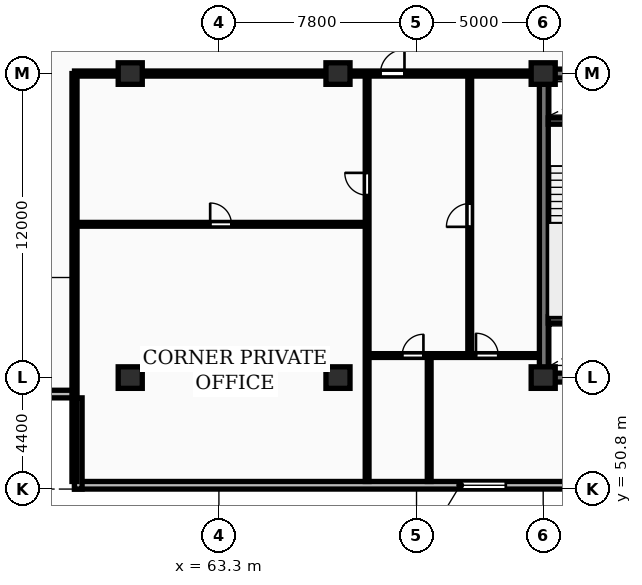
"""IFC4 building model, lengths in metres.
Left out: names, types, materials, properties, quantities, classifications, styles, units other than length and angle.
Written with IfcOpenShell. Run it as: python <this file> out.ifc"""

import sys

from ifc_helpers import new_model, si_unit, direction, frame, frame_2d, origin, origin_2d, place, context, subcontext, project, spatial, rectangle, extrude, element, fill, save


model = new_model("IFC4")
c1 = context("Model", 3, precision=1e-05, world=origin(), true_north=direction((0.0, 1.0)))
c2 = subcontext(c1, "Body", "Model", "MODEL_VIEW")
j1 = project(units=[si_unit("LENGTHUNIT", "METRE"), si_unit("PLANEANGLEUNIT", "RADIAN")], contexts=[c1])
p1 = place(None, origin())
s1 = spatial("IfcSite", under=j1, at=p1, CompositionType="ELEMENT")
p2 = place(p1, origin())
s2 = spatial("IfcBuilding", under=s1, at=p2, CompositionType="ELEMENT")
p3 = place(p2, frame((0.0, 0.0, 126.3)))
s3 = spatial("IfcBuildingStorey", under=s2, at=p3, CompositionType="ELEMENT", Elevation=126.3)
for number, where, z_axis, x_axis in (
    (1, (59.8, 55.2, 0.0), (0.0, 0.0, 1.0), (1.0, 0.0, 0.0)),
    (2, (59.8, 67.2, 0.0), (0.0, 0.0, 1.0), (1.0, 0.0, 0.0)),
    (3, (68.0, 55.2, 0.0), (0.0, 0.0, 1.0), (1.0, 0.0, 0.0)),
    (4, (68.0, 67.2, 0.0), (0.0, 0.0, 1.0), (1.0, 0.0, 0.0)),
    (5, (76.1, 55.2, 0.0), (0.0, 0.0, 1.0), (1.0, 0.0, 0.0)),
    (6, (76.1, 67.2, 0.0), (0.0, 0.0, 1.0), (1.0, 0.0, 0.0)),
):
    element("IfcColumn", number, at=place(p3, frame(where, z_axis=z_axis, x_axis=x_axis)), inside=s3, PredefinedType="COLUMN", context=c2, shape_type="SweptSolid", body=[
        extrude(rectangle(XDim=0.95, YDim=0.85, at=origin_2d()), origin(), (0.0, 0.0, 1.0), 3.25),
    ])
p4 = place(p3, frame((57.6, 50.95, 0.0), z_axis=(0.0, 0.0, 1.0), x_axis=(1.0, 0.0, 0.0)))
e7 = element("IfcWall", 7, at=p4, inside=s3, PredefinedType="STANDARD", context=c2, shape_type="SweptSolid", body=[
    extrude(rectangle(XDim=73.0, YDim=0.3, at=frame_2d((36.5, 0.0))), origin(), (0.0, 0.0, 1.0), 2.97),
])
p5 = place(p4, frame((15.225, 0.0, 0.85)))
e8 = element("IfcOpeningElement", 8, at=p5, cuts=e7, PredefinedType="OPENING", context=c2, shape_type="SweptSolid", body=[
    extrude(rectangle(XDim=1.8, YDim=1.8, at=frame_2d((0.9, 0.9))), frame((0.0, 0.16, 0.0), z_axis=(0.0, -1.0, 0.0), x_axis=(1.0, 0.0, 0.0)), (0.0, 0.0, 1.0), 0.32),
])
p6 = place(p4, frame((58.575, 0.0, 0.85)))
e9 = element("IfcOpeningElement", 9, at=p6, cuts=e7, PredefinedType="OPENING", context=c2, shape_type="SweptSolid", body=[
    extrude(rectangle(XDim=1.8, YDim=1.8, at=frame_2d((0.9, 0.9))), frame((0.0, 0.16, 0.0), z_axis=(0.0, -1.0, 0.0), x_axis=(1.0, 0.0, 0.0)), (0.0, 0.0, 1.0), 0.32),
])
p7 = place(p3, frame((54.0, 54.55, 0.0), z_axis=(0.0, 0.0, 1.0), x_axis=(1.0, 0.0, 0.0)))
e10 = element("IfcWall", 10, at=p7, inside=s3, PredefinedType="STANDARD", context=c2, shape_type="SweptSolid", body=[
    extrude(rectangle(XDim=3.6, YDim=0.3, at=frame_2d((1.8, 0.0))), origin(), (0.0, 0.0, 1.0), 2.97),
])
p8 = place(p3, frame((57.75, 54.4, 0.0), z_axis=(0.0, 0.0, 1.0), x_axis=(0.0, -1.0, 0.0)))
e11 = element("IfcWall", 11, at=p8, inside=s3, PredefinedType="STANDARD", context=c2, shape_type="SweptSolid", body=[
    extrude(rectangle(XDim=3.6, YDim=0.3, at=frame_2d((1.8, 0.0))), origin(), (0.0, 0.0, 1.0), 2.97),
])
p9 = place(p3, frame((75.95, 55.2, 0.0), z_axis=(0.0, 0.0, 1.0), x_axis=(1.0, 0.0, 0.0)))
e12 = element("IfcWall", 12, at=p9, inside=s3, PredefinedType="SHEAR", context=c2, shape_type="SweptSolid", body=[
    extrude(rectangle(XDim=36.3, YDim=0.35, at=frame_2d((18.15, 0.0))), origin(), (0.0, 0.0, 1.0), 3.25),
])
p10 = place(p3, frame((76.125, 55.375, 0.0), z_axis=(0.0, 0.0, 1.0), x_axis=(0.0, 1.0, 0.0)))
e13 = element("IfcWall", 13, at=p10, inside=s3, PredefinedType="SHEAR", context=c2, shape_type="SweptSolid", body=[
    extrude(rectangle(XDim=11.65, YDim=0.35, at=frame_2d((5.825, 0.0))), origin(), (0.0, 0.0, 1.0), 3.25),
])
p11 = place(p3, frame((75.95, 67.2, 0.0), z_axis=(0.0, 0.0, 1.0), x_axis=(1.0, 0.0, 0.0)))
e14 = element("IfcWall", 14, at=p11, inside=s3, PredefinedType="SHEAR", context=c2, shape_type="SweptSolid", body=[
    extrude(rectangle(XDim=36.3, YDim=0.35, at=frame_2d((18.15, 0.0))), origin(), (0.0, 0.0, 1.0), 3.25),
])
p12 = place(p11, frame((5.25, 0.0, 0.0)))
e15 = element("IfcOpeningElement", 15, at=p12, cuts=e14, PredefinedType="OPENING", context=c2, shape_type="SweptSolid", body=[
    extrude(rectangle(XDim=1.0, YDim=2.15, at=frame_2d((0.5, 1.075))), frame((0.0, 0.185, 0.0), z_axis=(0.0, -1.0, 0.0), x_axis=(1.0, 0.0, 0.0)), (0.0, 0.0, 1.0), 0.37),
])
p13 = place(p11, frame((21.6, 0.0, 0.0)))
e16 = element("IfcOpeningElement", 16, at=p13, cuts=e14, PredefinedType="OPENING", context=c2, shape_type="SweptSolid", body=[
    extrude(rectangle(XDim=1.5, YDim=2.2, at=frame_2d((0.75, 1.1))), frame((0.0, 0.185, 0.0), z_axis=(0.0, -1.0, 0.0), x_axis=(1.0, 0.0, 0.0)), (0.0, 0.0, 1.0), 0.37),
])
p14 = place(p11, frame((30.45, 0.0, 0.0)))
e17 = element("IfcOpeningElement", 17, at=p14, cuts=e14, PredefinedType="OPENING", context=c2, shape_type="SweptSolid", body=[
    extrude(rectangle(XDim=1.0, YDim=2.15, at=frame_2d((0.5, 1.075))), frame((0.0, 0.185, 0.0), z_axis=(0.0, -1.0, 0.0), x_axis=(1.0, 0.0, 0.0)), (0.0, 0.0, 1.0), 0.37),
])
for number, where, z_axis, x_axis in (
    (18, (76.3, 57.475, 0.0), (0.0, 0.0, 1.0), (1.0, 0.0, 0.0)),
    (19, (76.3, 65.325, 0.0), (0.0, 0.0, 1.0), (1.0, 0.0, 0.0)),
):
    element("IfcWall", number, at=place(p3, frame(where, z_axis=z_axis, x_axis=x_axis)), inside=s3, PredefinedType="SHEAR", context=c2, shape_type="SweptSolid", body=[
        extrude(rectangle(XDim=3.24, YDim=0.25, at=frame_2d((1.62, 0.0))), origin(), (0.0, 0.0, 1.0), 3.25),
    ])
p15 = place(p3, frame((57.6, 51.1, 0.0), z_axis=(0.0, 0.0, 1.0), x_axis=(0.0, 1.0, 0.0)))
e20 = element("IfcWall", 20, at=p15, inside=s3, PredefinedType="PARTITIONING", context=c2, shape_type="SweptSolid", body=[
    extrude(rectangle(XDim=16.1, YDim=0.2, at=frame_2d((8.05, 0.0))), origin(), (0.0, 0.0, 1.0), 2.97),
])
p16 = place(p3, frame((57.6, 61.25, 0.0), z_axis=(0.0, 0.0, 1.0), x_axis=(1.0, 0.0, 0.0)))
e21 = element("IfcWall", 21, at=p16, inside=s3, PredefinedType="PARTITIONING", context=c2, shape_type="SweptSolid", body=[
    extrude(rectangle(XDim=11.55, YDim=0.15, at=frame_2d((5.775, 0.0))), origin(), (0.0, 0.0, 1.0), 2.97),
])
p17 = place(p16, frame((5.355, 0.0, 0.0)))
e22 = element("IfcOpeningElement", 22, at=p17, cuts=e21, PredefinedType="OPENING", context=c2, shape_type="SweptSolid", body=[
    extrude(rectangle(XDim=0.84, YDim=2.04, at=frame_2d((0.42, 1.02))), frame((0.0, 0.085, 0.0), z_axis=(0.0, -1.0, 0.0), x_axis=(1.0, 0.0, 0.0)), (0.0, 0.0, 1.0), 0.17),
])
p18 = place(p3, frame((69.15, 51.1, 0.0), z_axis=(0.0, 0.0, 1.0), x_axis=(0.0, 1.0, 0.0)))
e23 = element("IfcWall", 23, at=p18, inside=s3, PredefinedType="PARTITIONING", context=c2, shape_type="SweptSolid", body=[
    extrude(rectangle(XDim=16.05, YDim=0.15, at=frame_2d((8.025, 0.0))), origin(), (0.0, 0.0, 1.0), 2.97),
])
p19 = place(p18, frame((11.3, 0.0, 0.0)))
e24 = element("IfcOpeningElement", 24, at=p19, cuts=e23, PredefinedType="OPENING", context=c2, shape_type="SweptSolid", body=[
    extrude(rectangle(XDim=0.88, YDim=2.06, at=frame_2d((0.44, 1.03))), frame((0.0, 0.085, 0.0), z_axis=(0.0, -1.0, 0.0), x_axis=(1.0, 0.0, 0.0)), (0.0, 0.0, 1.0), 0.17),
])
p20 = place(p3, frame((73.2, 56.07, 0.0), z_axis=(0.0, 0.0, 1.0), x_axis=(0.0, 1.0, 0.0)))
e25 = element("IfcWall", 25, at=p20, inside=s3, PredefinedType="PARTITIONING", context=c2, shape_type="SweptSolid", body=[
    extrude(rectangle(XDim=11.08, YDim=0.15, at=frame_2d((5.54, 0.0))), origin(), (0.0, 0.0, 1.0), 2.97),
])
p21 = place(p20, frame((5.08, 0.0, 0.0)))
e26 = element("IfcOpeningElement", 26, at=p21, cuts=e25, PredefinedType="OPENING", context=c2, shape_type="SweptSolid", body=[
    extrude(rectangle(XDim=0.92, YDim=2.08, at=frame_2d((0.46, 1.04))), frame((0.0, 0.085, 0.0), z_axis=(0.0, -1.0, 0.0), x_axis=(1.0, 0.0, 0.0)), (0.0, 0.0, 1.0), 0.17),
])
p22 = place(p3, frame((71.6, 51.1, 0.0), z_axis=(0.0, 0.0, 1.0), x_axis=(0.0, 1.0, 0.0)))
e27 = element("IfcWall", 27, at=p22, inside=s3, PredefinedType="PARTITIONING", context=c2, shape_type="SweptSolid", body=[
    extrude(rectangle(XDim=4.97, YDim=0.15, at=frame_2d((2.485, 0.0))), origin(), (0.0, 0.0, 1.0), 2.97),
])
p23 = place(p3, frame((69.17, 56.07, 0.0), z_axis=(0.0, 0.0, 1.0), x_axis=(1.0, 0.0, 0.0)))
e28 = element("IfcWall", 28, at=p23, inside=s3, PredefinedType="PARTITIONING", context=c2, shape_type="SweptSolid", body=[
    extrude(rectangle(XDim=6.76, YDim=0.15, at=frame_2d((3.38, 0.0))), origin(), (0.0, 0.0, 1.0), 2.97),
])
p24 = place(p23, frame((1.362, 0.0, 0.0)))
e29 = element("IfcOpeningElement", 29, at=p24, cuts=e28, PredefinedType="OPENING", context=c2, shape_type="SweptSolid", body=[
    extrude(rectangle(XDim=0.84, YDim=2.04, at=frame_2d((0.42, 1.02))), frame((0.0, 0.085, 0.0), z_axis=(0.0, -1.0, 0.0), x_axis=(1.0, 0.0, 0.0)), (0.0, 0.0, 1.0), 0.17),
])
p25 = place(p23, frame((4.277, 0.0, 0.0)))
e30 = element("IfcOpeningElement", 30, at=p25, cuts=e28, PredefinedType="OPENING", context=c2, shape_type="SweptSolid", body=[
    extrude(rectangle(XDim=0.88, YDim=2.06, at=frame_2d((0.44, 1.03))), frame((0.0, 0.085, 0.0), z_axis=(0.0, -1.0, 0.0), x_axis=(1.0, 0.0, 0.0)), (0.0, 0.0, 1.0), 0.17),
])
p26 = place(p3, frame((57.6, 67.2, 0.0), z_axis=(0.0, 0.0, 1.0), x_axis=(1.0, 0.0, 0.0)))
e31 = element("IfcWall", 31, at=p26, inside=s3, PredefinedType="PARTITIONING", context=c2, shape_type="SweptSolid", body=[
    extrude(rectangle(XDim=18.35, YDim=0.2, at=frame_2d((9.175, 0.0))), origin(), (0.0, 0.0, 1.0), 2.433),
])
p27 = place(p26, frame((12.075, 0.0, 0.0)))
e32 = element("IfcOpeningElement", 32, at=p27, cuts=e31, PredefinedType="OPENING", context=c2, shape_type="SweptSolid", body=[
    extrude(rectangle(XDim=0.95, YDim=2.15, at=frame_2d((0.475, 1.075))), frame((0.0, 0.11, 0.0), z_axis=(0.0, -1.0, 0.0), x_axis=(1.0, 0.0, 0.0)), (0.0, 0.0, 1.0), 0.22),
])
p28 = place(p5, origin())
e33 = element("IfcWindow", 33, at=p28, inside=s3, PartitioningType="SINGLE_PANEL", PredefinedType="WINDOW", context=c2, shape_type="SweptSolid", body=[
    extrude(rectangle(XDim=1.8, YDim=1.8, at=frame_2d((0.9, 0.9))), frame((0.0, 0.03, 0.0), z_axis=(0.0, -1.0, 0.0), x_axis=(1.0, 0.0, 0.0)), (0.0, 0.0, 1.0), 0.06),
])
fill(e8, e33)
p29 = place(p17, origin())
e34 = element("IfcDoor", 34, at=p29, inside=s3, OperationType="SINGLE_SWING_LEFT", PredefinedType="DOOR", context=c2, shape_type="SweptSolid", body=[
    extrude(rectangle(XDim=0.84, YDim=2.04, at=frame_2d((0.42, 1.02))), frame((0.0, 0.025, 0.0), z_axis=(0.0, -1.0, 0.0), x_axis=(1.0, 0.0, 0.0)), (0.0, 0.0, 1.0), 0.05),
])
fill(e22, e34)
p30 = place(p19, origin())
e35 = element("IfcDoor", 35, at=p30, inside=s3, OperationType="SINGLE_SWING_RIGHT", PredefinedType="DOOR", context=c2, shape_type="SweptSolid", body=[
    extrude(rectangle(XDim=0.88, YDim=2.06, at=frame_2d((0.44, 1.03))), frame((0.0, 0.025, 0.0), z_axis=(0.0, -1.0, 0.0), x_axis=(1.0, 0.0, 0.0)), (0.0, 0.0, 1.0), 0.05),
])
fill(e24, e35)
p31 = place(p21, origin())
e36 = element("IfcDoor", 36, at=p31, inside=s3, OperationType="SINGLE_SWING_LEFT", PredefinedType="DOOR", context=c2, shape_type="SweptSolid", body=[
    extrude(rectangle(XDim=0.92, YDim=2.08, at=frame_2d((0.46, 1.04))), frame((0.0, 0.025, 0.0), z_axis=(0.0, -1.0, 0.0), x_axis=(1.0, 0.0, 0.0)), (0.0, 0.0, 1.0), 0.05),
])
fill(e26, e36)
p32 = place(p24, origin())
e37 = element("IfcDoor", 37, at=p32, inside=s3, OperationType="SINGLE_SWING_RIGHT", PredefinedType="DOOR", context=c2, shape_type="SweptSolid", body=[
    extrude(rectangle(XDim=0.84, YDim=2.04, at=frame_2d((0.42, 1.02))), frame((0.0, 0.025, 0.0), z_axis=(0.0, -1.0, 0.0), x_axis=(1.0, 0.0, 0.0)), (0.0, 0.0, 1.0), 0.05),
])
fill(e29, e37)
p33 = place(p25, origin())
e38 = element("IfcDoor", 38, at=p33, inside=s3, OperationType="SINGLE_SWING_LEFT", PredefinedType="DOOR", context=c2, shape_type="SweptSolid", body=[
    extrude(rectangle(XDim=0.88, YDim=2.06, at=frame_2d((0.44, 1.03))), frame((0.0, 0.025, 0.0), z_axis=(0.0, -1.0, 0.0), x_axis=(1.0, 0.0, 0.0)), (0.0, 0.0, 1.0), 0.05),
])
fill(e30, e38)
p34 = place(p27, origin())
e39 = element("IfcDoor", 39, at=p34, inside=s3, OperationType="SINGLE_SWING_RIGHT", PredefinedType="DOOR", context=c2, shape_type="SweptSolid", body=[
    extrude(rectangle(XDim=0.95, YDim=2.15, at=frame_2d((0.475, 1.075))), frame((0.0, 0.025, 0.0), z_axis=(0.0, -1.0, 0.0), x_axis=(1.0, 0.0, 0.0)), (0.0, 0.0, 1.0), 0.05),
])
fill(e32, e39)
save(model, sys.argv[1])
